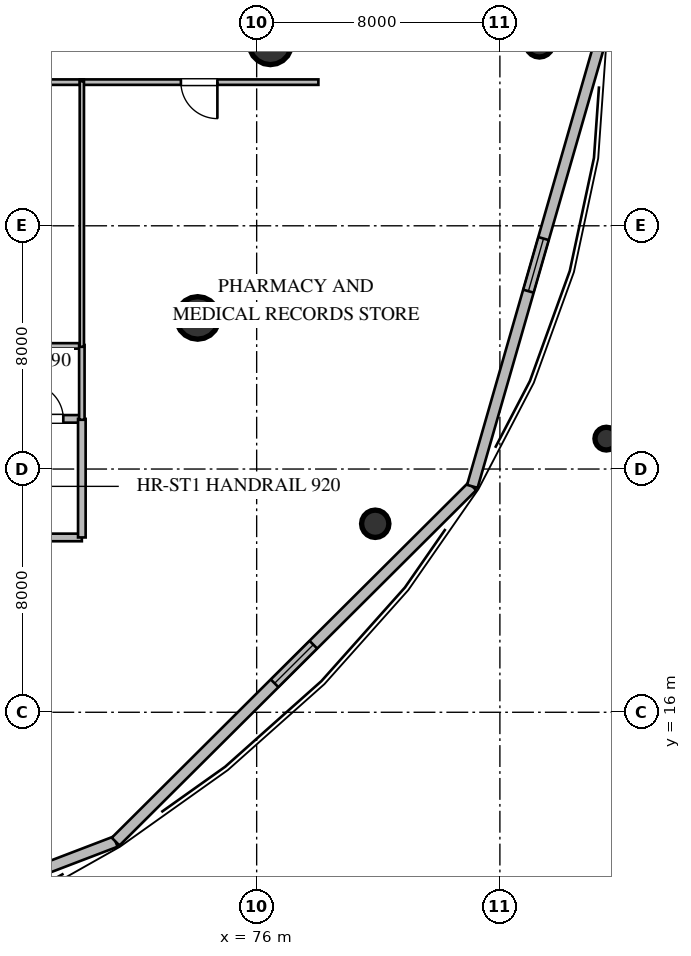
"""IFC4 building model, lengths in metres.
Left out: names, types, materials, properties, quantities, classifications, styles, units other than length and angle.
Written with IfcOpenShell. Run it as: python <this file> out.ifc"""

import sys

from ifc_helpers import new_model, si_unit, direction, frame, frame_2d, origin, origin_2d, place, context, subcontext, project, spatial, rectangle, circle, extrude, element, fill, save


model = new_model("IFC4")
c1 = context("Model", 3, precision=1e-05, world=origin(), true_north=direction((0.0, 1.0)))
c2 = subcontext(c1, "Body", "Model", "MODEL_VIEW")
j1 = project(units=[si_unit("LENGTHUNIT", "METRE"), si_unit("PLANEANGLEUNIT", "RADIAN")], contexts=[c1])
p1 = place(None, origin())
s1 = spatial("IfcSite", under=j1, at=p1, CompositionType="ELEMENT")
p2 = place(p1, origin())
s2 = spatial("IfcBuilding", under=s1, at=p2, CompositionType="ELEMENT")
p3 = place(p2, frame((0.0, 0.0, 14.4)))
s3 = spatial("IfcBuildingStorey", under=s2, at=p3, CompositionType="ELEMENT", Elevation=14.4)
for number, where, z_axis, x_axis in (
    (1, (76.45, 38.0, 0.0), (0.0, 0.0, 1.0), (1.0, 0.0, 0.0)),
    (2, (74.06, 28.97, 0.0), (0.0, 0.0, 1.0), (1.0, 0.0, 0.0)),
):
    element("IfcColumn", number, at=place(p3, frame(where, z_axis=z_axis, x_axis=x_axis)), inside=s3, PredefinedType="COLUMN", context=c2, shape_type="SweptSolid", body=[
        extrude(circle(Radius=0.7, at=origin_2d()), origin(), (0.0, 0.0, 1.0), 4.8),
    ])
for number, where, z_axis, x_axis in (
    (3, (85.3, 38.0, 0.0), (0.0, 0.0, 1.0), (1.0, 0.0, 0.0)),
    (4, (79.9, 22.2, 0.0), (0.0, 0.0, 1.0), (1.0, 0.0, 0.0)),
):
    element("IfcColumn", number, at=place(p3, frame(where, z_axis=z_axis, x_axis=x_axis)), inside=s3, PredefinedType="COLUMN", context=c2, shape_type="SweptSolid", body=[
        extrude(circle(Radius=0.45, at=origin_2d()), origin(), (0.0, 0.0, 1.0), 4.8),
    ])
p4 = place(p3, frame((87.5, 25.0, 0.0), z_axis=(0.0, 0.0, 1.0), x_axis=(1.0, 0.0, 0.0)))
e5 = element("IfcColumn", 5, at=p4, inside=s3, PredefinedType="COLUMN", context=c2, shape_type="SweptSolid", body=[
    extrude(circle(Radius=0.375, at=origin_2d()), origin(), (0.0, 0.0, 1.0), 4.8),
])
p5 = place(p3, frame((54.408, 5.262, 0.0), z_axis=(0.0, 0.0, 1.0), x_axis=(0.934014086565, 0.357236176917, 0.0)))
e6 = element("IfcWall", 6, at=p5, inside=s3, PredefinedType="STANDARD", context=c2, shape_type="SweptSolid", body=[
    extrude(rectangle(XDim=18.151, YDim=0.36, at=frame_2d((9.075, 0.0))), origin(), (0.0, 0.0, 1.0), 4.52),
])
p6 = place(p5, frame((8.175, 0.0, 1.05)))
e7 = element("IfcOpeningElement", 7, at=p6, cuts=e6, PredefinedType="OPENING", context=c2, shape_type="SweptSolid", body=[
    extrude(rectangle(XDim=1.8, YDim=1.7, at=frame_2d((0.9, 0.85))), frame((0.0, 0.19, 0.0), z_axis=(0.0, -1.0, 0.0), x_axis=(1.0, 0.0, 0.0)), (0.0, 0.0, 1.0), 0.38),
])
p7 = place(p3, frame((71.361, 11.746, 0.0), z_axis=(0.0, 0.0, 1.0), x_axis=(0.708557675059, 0.705652904135, 0.0)))
e8 = element("IfcWall", 8, at=p7, inside=s3, PredefinedType="STANDARD", context=c2, shape_type="SweptSolid", body=[
    extrude(rectangle(XDim=16.557, YDim=0.36, at=frame_2d((8.279, 0.0))), origin(), (0.0, 0.0, 1.0), 4.52),
])
p8 = place(p7, frame((7.379, 0.0, 1.05)))
e9 = element("IfcOpeningElement", 9, at=p8, cuts=e8, PredefinedType="OPENING", context=c2, shape_type="SweptSolid", body=[
    extrude(rectangle(XDim=1.8, YDim=1.7, at=frame_2d((0.9, 0.85))), frame((0.0, 0.19, 0.0), z_axis=(0.0, -1.0, 0.0), x_axis=(1.0, 0.0, 0.0)), (0.0, 0.0, 1.0), 0.38),
])
p9 = place(p3, frame((83.093, 23.43, 0.0), z_axis=(0.0, 0.0, 1.0), x_axis=(0.276192699339, 0.961102280109, 0.0)))
e10 = element("IfcWall", 10, at=p9, inside=s3, PredefinedType="STANDARD", context=c2, shape_type="SweptSolid", body=[
    extrude(rectangle(XDim=15.16, YDim=0.36, at=frame_2d((7.58, 0.0))), origin(), (0.0, 0.0, 1.0), 4.52),
])
p10 = place(p9, frame((6.68, 0.0, 1.05)))
e11 = element("IfcOpeningElement", 11, at=p10, cuts=e10, PredefinedType="OPENING", context=c2, shape_type="SweptSolid", body=[
    extrude(rectangle(XDim=1.8, YDim=1.7, at=frame_2d((0.9, 0.85))), frame((0.0, 0.19, 0.0), z_axis=(0.0, -1.0, 0.0), x_axis=(1.0, 0.0, 0.0)), (0.0, 0.0, 1.0), 0.38),
])
p11 = place(p3, frame((62.35, 25.65, 0.0), z_axis=(0.0, 0.0, 1.0), x_axis=(1.0, 0.0, 0.0)))
e12 = element("IfcWall", 12, at=p11, inside=s3, PredefinedType="SOLIDWALL", context=c2, shape_type="SweptSolid", body=[
    extrude(rectangle(XDim=7.9, YDim=0.25, at=frame_2d((3.95, 0.0))), origin(), (0.0, 0.0, 1.0), 4.52),
])
p12 = place(p11, frame((6.14, 0.0, 0.0)))
e13 = element("IfcOpeningElement", 13, at=p12, cuts=e12, PredefinedType="OPENING", context=c2, shape_type="SweptSolid", body=[
    extrude(rectangle(XDim=1.15, YDim=2.1, at=frame_2d((0.575, 1.05))), frame((0.0, 0.135, 0.0), z_axis=(0.0, -1.0, 0.0), x_axis=(1.0, 0.0, 0.0)), (0.0, 0.0, 1.0), 0.27),
])
p13 = place(p3, frame((62.35, 21.75, 0.0), z_axis=(0.0, 0.0, 1.0), x_axis=(1.0, 0.0, 0.0)))
e14 = element("IfcWall", 14, at=p13, inside=s3, PredefinedType="SOLIDWALL", context=c2, shape_type="SweptSolid", body=[
    extrude(rectangle(XDim=7.9, YDim=0.25, at=frame_2d((3.95, 0.0))), origin(), (0.0, 0.0, 1.0), 4.52),
])
p14 = place(p3, frame((70.25, 21.75, 0.0), z_axis=(0.0, 0.0, 1.0), x_axis=(0.0, 1.0, 0.0)))
e15 = element("IfcWall", 15, at=p14, inside=s3, PredefinedType="SOLIDWALL", context=c2, shape_type="SweptSolid", body=[
    extrude(rectangle(XDim=3.9, YDim=0.25, at=frame_2d((1.95, 0.0))), origin(), (0.0, 0.0, 1.0), 4.52),
])
p15 = place(p3, frame((70.315, 36.725, 0.0), z_axis=(0.0, 0.0, 1.0), x_axis=(-1.0, 0.0, 0.0)))
e16 = element("IfcWall", 16, at=p15, inside=s3, PredefinedType="PARTITIONING", context=c2, shape_type="SweptSolid", body=[
    extrude(rectangle(XDim=23.62, YDim=0.18, at=frame_2d((11.81, 0.0))), origin(), (0.0, 0.0, 1.0), 4.05),
])
p16 = place(p15, frame((11.21, 0.0, 0.0)))
e17 = element("IfcOpeningElement", 17, at=p16, cuts=e16, PredefinedType="OPENING", context=c2, shape_type="SweptSolid", body=[
    extrude(rectangle(XDim=1.2, YDim=2.15, at=frame_2d((0.6, 1.075))), frame((0.0, 0.1, 0.0), z_axis=(0.0, -1.0, 0.0), x_axis=(1.0, 0.0, 0.0)), (0.0, 0.0, 1.0), 0.2),
])
p17 = place(p3, frame((46.695, 28.05, 0.0), z_axis=(0.0, 0.0, 1.0), x_axis=(1.0, 0.0, 0.0)))
e18 = element("IfcWall", 18, at=p17, inside=s3, PredefinedType="PARTITIONING", context=c2, shape_type="SweptSolid", body=[
    extrude(rectangle(XDim=23.585, YDim=0.18, at=frame_2d((11.792, 0.0))), origin(), (0.0, 0.0, 1.0), 4.05),
])
p18 = place(p3, frame((78.03, 36.725, 0.0), z_axis=(0.0, 0.0, 1.0), x_axis=(-1.0, 0.0, 0.0)))
e19 = element("IfcWall", 19, at=p18, inside=s3, PredefinedType="PARTITIONING", context=c2, shape_type="SweptSolid", body=[
    extrude(rectangle(XDim=7.845, YDim=0.18, at=frame_2d((3.922, 0.0))), origin(), (0.0, 0.0, 1.0), 4.52),
])
p19 = place(p18, frame((3.322, 0.0, 0.0)))
e20 = element("IfcOpeningElement", 20, at=p19, cuts=e19, PredefinedType="OPENING", context=c2, shape_type="SweptSolid", body=[
    extrude(rectangle(XDim=1.2, YDim=2.15, at=frame_2d((0.6, 1.075))), frame((0.0, 0.1, 0.0), z_axis=(0.0, -1.0, 0.0), x_axis=(1.0, 0.0, 0.0)), (0.0, 0.0, 1.0), 0.2),
])
p20 = place(p3, frame((70.25, 28.08, 0.0), z_axis=(0.0, 0.0, 1.0), x_axis=(0.0, -1.0, 0.0)))
e21 = element("IfcWall", 21, at=p20, inside=s3, PredefinedType="PARTITIONING", context=c2, shape_type="SweptSolid", body=[
    extrude(rectangle(XDim=2.46, YDim=0.18, at=frame_2d((1.23, 0.0))), origin(), (0.0, 0.0, 1.0), 4.52),
])
p21 = place(p3, frame((70.25, 36.755, 0.0), z_axis=(0.0, 0.0, 1.0), x_axis=(0.0, -1.0, 0.0)))
e22 = element("IfcWall", 22, at=p21, inside=s3, PredefinedType="PARTITIONING", context=c2, shape_type="SweptSolid", body=[
    extrude(rectangle(XDim=8.735, YDim=0.14, at=frame_2d((4.367, 0.0))), origin(), (0.0, 0.0, 1.0), 4.52),
])
p22 = place(p8, origin())
e23 = element("IfcWindow", 23, at=p22, inside=s3, PartitioningType="SINGLE_PANEL", PredefinedType="WINDOW", context=c2, shape_type="SweptSolid", body=[
    extrude(rectangle(XDim=1.8, YDim=1.7, at=frame_2d((0.9, 0.85))), frame((0.0, 0.03, 0.0), z_axis=(0.0, -1.0, 0.0), x_axis=(1.0, 0.0, 0.0)), (0.0, 0.0, 1.0), 0.06),
])
fill(e9, e23)
p23 = place(p10, origin())
e24 = element("IfcWindow", 24, at=p23, inside=s3, PartitioningType="SINGLE_PANEL", PredefinedType="WINDOW", context=c2, shape_type="SweptSolid", body=[
    extrude(rectangle(XDim=1.8, YDim=1.7, at=frame_2d((0.9, 0.85))), frame((0.0, 0.03, 0.0), z_axis=(0.0, -1.0, 0.0), x_axis=(1.0, 0.0, 0.0)), (0.0, 0.0, 1.0), 0.06),
])
fill(e11, e24)
p24 = place(p12, origin())
e25 = element("IfcDoor", 25, at=p24, inside=s3, OperationType="SINGLE_SWING_LEFT", PredefinedType="DOOR", context=c2, shape_type="SweptSolid", body=[
    extrude(rectangle(XDim=1.15, YDim=2.1, at=frame_2d((0.575, 1.05))), frame((0.0, 0.025, 0.0), z_axis=(0.0, -1.0, 0.0), x_axis=(1.0, 0.0, 0.0)), (0.0, 0.0, 1.0), 0.05),
])
fill(e13, e25)
p25 = place(p19, origin())
e26 = element("IfcDoor", 26, at=p25, inside=s3, OperationType="SINGLE_SWING_LEFT", PredefinedType="DOOR", context=c2, shape_type="SweptSolid", body=[
    extrude(rectangle(XDim=1.2, YDim=2.15, at=frame_2d((0.6, 1.075))), frame((0.0, 0.025, 0.0), z_axis=(0.0, -1.0, 0.0), x_axis=(1.0, 0.0, 0.0)), (0.0, 0.0, 1.0), 0.05),
])
fill(e20, e26)
save(model, sys.argv[1])
